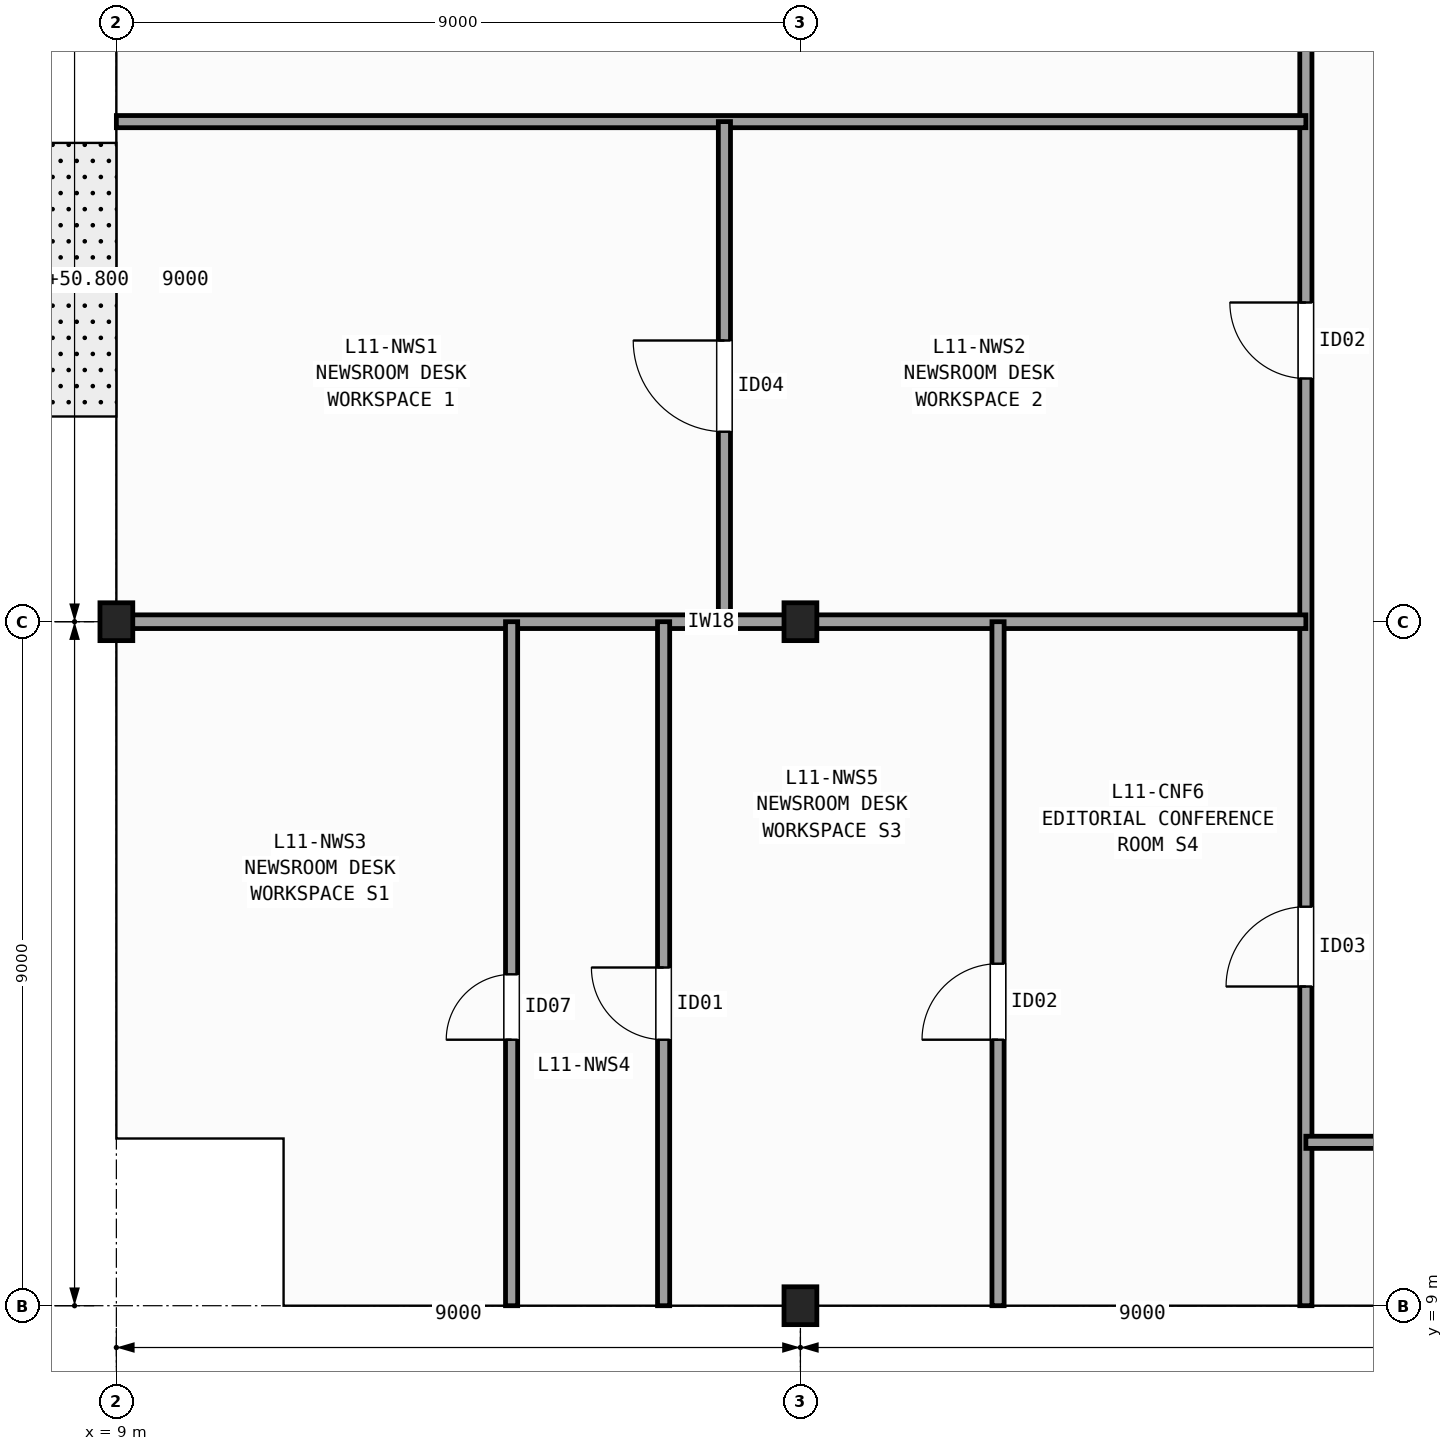
"""IFC4 building model, lengths in metres.
Left out: names, types, materials, properties, quantities, classifications, styles, units other than length and angle.
Written with IfcOpenShell. Run it as: python <this file> out.ifc"""

import sys

from ifc_helpers import new_model, si_unit, direction, frame, frame_2d, origin, origin_2d, place, context, subcontext, project, spatial, rectangle, i_section, extrude, element, fill, save


model = new_model("IFC4")
c1 = context("Model", 3, precision=1e-05, world=origin(), true_north=direction((0.0, 1.0)))
c2 = subcontext(c1, "Body", "Model", "MODEL_VIEW")
j1 = project(units=[si_unit("LENGTHUNIT", "METRE"), si_unit("PLANEANGLEUNIT", "RADIAN")], contexts=[c1])
p1 = place(None, origin())
s1 = spatial("IfcSite", under=j1, at=p1, CompositionType="ELEMENT")
p2 = place(p1, origin())
s2 = spatial("IfcBuilding", under=s1, at=p2, CompositionType="ELEMENT")
p3 = place(p2, frame((0.0, 0.0, 50.8)))
s3 = spatial("IfcBuildingStorey", under=s2, at=p3, CompositionType="ELEMENT", Elevation=50.8)
for number, where, z_axis, x_axis in (
    (1, (9.0, 18.0, 0.0), (0.0, 0.0, 1.0), (1.0, 0.0, 0.0)),
    (2, (18.0, 9.0, 0.0), (0.0, 0.0, 1.0), (1.0, 0.0, 0.0)),
    (3, (18.0, 18.0, 0.0), (0.0, 0.0, 1.0), (1.0, 0.0, 0.0)),
):
    element("IfcColumn", number, at=place(p3, frame(where, z_axis=z_axis, x_axis=x_axis)), inside=s3, PredefinedType="COLUMN", context=c2, shape_type="SweptSolid", body=[
        extrude(i_section(OverallWidth=0.432, OverallDepth=0.498, WebThickness=0.056, FlangeThickness=0.089, FilletRadius=0.015, at=origin_2d()), origin(), (0.0, 0.0, 1.0), 3.7),
    ])
p4 = place(p3, frame((24.65, 9.0, 0.0), z_axis=(0.0, 0.0, 1.0), x_axis=(0.0, 1.0, 0.0)))
e4 = element("IfcWall", 4, at=p4, inside=s3, PredefinedType="PARTITIONING", context=c2, shape_type="SweptSolid", body=[
    extrude(rectangle(XDim=19.2, YDim=0.16, at=frame_2d((9.6, 0.0))), origin(), (0.0, 0.0, 1.0), 2.627),
])
p5 = place(p4, frame((12.2, 0.0, 0.0)))
e5 = element("IfcOpeningElement", 5, at=p5, cuts=e4, PredefinedType="OPENING", context=c2, shape_type="SweptSolid", body=[
    extrude(rectangle(XDim=1.0, YDim=2.1, at=frame_2d((0.5, 1.05))), frame((0.0, 0.09, 0.0), z_axis=(0.0, -1.0, 0.0), x_axis=(1.0, 0.0, 0.0)), (0.0, 0.0, 1.0), 0.18),
])
p6 = place(p4, frame((4.2, 0.0, 0.0)))
e6 = element("IfcOpeningElement", 6, at=p6, cuts=e4, PredefinedType="OPENING", context=c2, shape_type="SweptSolid", body=[
    extrude(rectangle(XDim=1.05, YDim=2.15, at=frame_2d((0.525, 1.075))), frame((0.0, 0.09, 0.0), z_axis=(0.0, -1.0, 0.0), x_axis=(1.0, 0.0, 0.0)), (0.0, 0.0, 1.0), 0.18),
])
p7 = place(p3, frame((9.0, 24.58, 0.0), z_axis=(0.0, 0.0, 1.0), x_axis=(1.0, 0.0, 0.0)))
e7 = element("IfcWall", 7, at=p7, inside=s3, PredefinedType="PARTITIONING", context=c2, shape_type="SweptSolid", body=[
    extrude(rectangle(XDim=15.65, YDim=0.16, at=frame_2d((7.825, 0.0))), origin(), (0.0, 0.0, 1.0), 2.627),
])
p8 = place(p3, frame((9.0, 18.0, 0.0), z_axis=(0.0, 0.0, 1.0), x_axis=(1.0, 0.0, 0.0)))
e8 = element("IfcWall", 8, at=p8, inside=s3, PredefinedType="PARTITIONING", context=c2, shape_type="SweptSolid", body=[
    extrude(rectangle(XDim=15.65, YDim=0.18, at=frame_2d((7.825, 0.0))), origin(), (0.0, 0.0, 1.0), 2.627),
])
p9 = place(p3, frame((17.0, 18.0, 0.0), z_axis=(0.0, 0.0, 1.0), x_axis=(0.0, 1.0, 0.0)))
e9 = element("IfcWall", 9, at=p9, inside=s3, PredefinedType="PARTITIONING", context=c2, shape_type="SweptSolid", body=[
    extrude(rectangle(XDim=6.58, YDim=0.16, at=frame_2d((3.29, 0.0))), origin(), (0.0, 0.0, 1.0), 2.789),
])
p10 = place(p9, frame((2.5, 0.0, 0.0)))
e10 = element("IfcOpeningElement", 10, at=p10, cuts=e9, PredefinedType="OPENING", context=c2, shape_type="SweptSolid", body=[
    extrude(rectangle(XDim=1.2, YDim=2.15, at=frame_2d((0.6, 1.075))), frame((0.0, 0.09, 0.0), z_axis=(0.0, -1.0, 0.0), x_axis=(1.0, 0.0, 0.0)), (0.0, 0.0, 1.0), 0.18),
])
p11 = place(p3, frame((14.2, 9.0, 0.0), z_axis=(0.0, 0.0, 1.0), x_axis=(0.0, 1.0, 0.0)))
e11 = element("IfcWall", 11, at=p11, inside=s3, PredefinedType="PARTITIONING", context=c2, shape_type="SweptSolid", body=[
    extrude(rectangle(XDim=9.0, YDim=0.16, at=frame_2d((4.5, 0.0))), origin(), (0.0, 0.0, 1.0), 2.789),
])
p12 = place(p11, frame((3.5, 0.0, 0.0)))
e12 = element("IfcOpeningElement", 12, at=p12, cuts=e11, PredefinedType="OPENING", context=c2, shape_type="SweptSolid", body=[
    extrude(rectangle(XDim=0.86, YDim=2.05, at=frame_2d((0.43, 1.025))), frame((0.0, 0.09, 0.0), z_axis=(0.0, -1.0, 0.0), x_axis=(1.0, 0.0, 0.0)), (0.0, 0.0, 1.0), 0.18),
])
p13 = place(p3, frame((16.2, 9.0, 0.0), z_axis=(0.0, 0.0, 1.0), x_axis=(0.0, 1.0, 0.0)))
e13 = element("IfcWall", 13, at=p13, inside=s3, PredefinedType="PARTITIONING", context=c2, shape_type="SweptSolid", body=[
    extrude(rectangle(XDim=9.0, YDim=0.16, at=frame_2d((4.5, 0.0))), origin(), (0.0, 0.0, 1.0), 2.789),
])
p14 = place(p13, frame((3.5, 0.0, 0.0)))
e14 = element("IfcOpeningElement", 14, at=p14, cuts=e13, PredefinedType="OPENING", context=c2, shape_type="SweptSolid", body=[
    extrude(rectangle(XDim=0.95, YDim=2.1, at=frame_2d((0.475, 1.05))), frame((0.0, 0.09, 0.0), z_axis=(0.0, -1.0, 0.0), x_axis=(1.0, 0.0, 0.0)), (0.0, 0.0, 1.0), 0.18),
])
p15 = place(p3, frame((20.6, 9.0, 0.0), z_axis=(0.0, 0.0, 1.0), x_axis=(0.0, 1.0, 0.0)))
e15 = element("IfcWall", 15, at=p15, inside=s3, PredefinedType="PARTITIONING", context=c2, shape_type="SweptSolid", body=[
    extrude(rectangle(XDim=9.0, YDim=0.16, at=frame_2d((4.5, 0.0))), origin(), (0.0, 0.0, 1.0), 2.627),
])
p16 = place(p15, frame((3.5, 0.0, 0.0)))
e16 = element("IfcOpeningElement", 16, at=p16, cuts=e15, PredefinedType="OPENING", context=c2, shape_type="SweptSolid", body=[
    extrude(rectangle(XDim=1.0, YDim=2.1, at=frame_2d((0.5, 1.05))), frame((0.0, 0.09, 0.0), z_axis=(0.0, -1.0, 0.0), x_axis=(1.0, 0.0, 0.0)), (0.0, 0.0, 1.0), 0.18),
])
p17 = place(p3, frame((24.65, 11.15, 0.0), z_axis=(0.0, 0.0, 1.0), x_axis=(1.0, 0.0, 0.0)))
e17 = element("IfcWall", 17, at=p17, inside=s3, PredefinedType="PARTITIONING", context=c2, shape_type="SweptSolid", body=[
    extrude(rectangle(XDim=4.75, YDim=0.16, at=frame_2d((2.375, 0.0))), origin(), (0.0, 0.0, 1.0), 2.792),
])
p18 = place(p17, frame((1.2, 0.0, 0.0)))
e18 = element("IfcOpeningElement", 18, at=p18, cuts=e17, PredefinedType="OPENING", context=c2, shape_type="SweptSolid", body=[
    extrude(rectangle(XDim=0.95, YDim=2.1, at=frame_2d((0.475, 1.05))), frame((0.0, 0.09, 0.0), z_axis=(0.0, -1.0, 0.0), x_axis=(1.0, 0.0, 0.0)), (0.0, 0.0, 1.0), 0.18),
])
p19 = place(p5, origin())
e19 = element("IfcDoor", 19, at=p19, inside=s3, OperationType="SINGLE_SWING_RIGHT", PredefinedType="DOOR", context=c2, shape_type="SweptSolid", body=[
    extrude(rectangle(XDim=1.0, YDim=2.1, at=frame_2d((0.5, 1.05))), frame((0.0, 0.025, 0.0), z_axis=(0.0, -1.0, 0.0), x_axis=(1.0, 0.0, 0.0)), (0.0, 0.0, 1.0), 0.05),
])
fill(e5, e19)
p20 = place(p6, origin())
e20 = element("IfcDoor", 20, at=p20, inside=s3, OperationType="SINGLE_SWING_LEFT", PredefinedType="DOOR", context=c2, shape_type="SweptSolid", body=[
    extrude(rectangle(XDim=1.05, YDim=2.15, at=frame_2d((0.525, 1.075))), frame((0.0, 0.025, 0.0), z_axis=(0.0, -1.0, 0.0), x_axis=(1.0, 0.0, 0.0)), (0.0, 0.0, 1.0), 0.05),
])
fill(e6, e20)
p21 = place(p10, origin())
e21 = element("IfcDoor", 21, at=p21, inside=s3, OperationType="SINGLE_SWING_RIGHT", PredefinedType="DOOR", context=c2, shape_type="SweptSolid", body=[
    extrude(rectangle(XDim=1.2, YDim=2.15, at=frame_2d((0.6, 1.075))), frame((0.0, 0.025, 0.0), z_axis=(0.0, -1.0, 0.0), x_axis=(1.0, 0.0, 0.0)), (0.0, 0.0, 1.0), 0.05),
])
fill(e10, e21)
p22 = place(p12, origin())
e22 = element("IfcDoor", 22, at=p22, inside=s3, OperationType="SINGLE_SWING_LEFT", PredefinedType="DOOR", context=c2, shape_type="SweptSolid", body=[
    extrude(rectangle(XDim=0.86, YDim=2.05, at=frame_2d((0.43, 1.025))), frame((0.0, 0.025, 0.0), z_axis=(0.0, -1.0, 0.0), x_axis=(1.0, 0.0, 0.0)), (0.0, 0.0, 1.0), 0.05),
])
fill(e12, e22)
p23 = place(p14, origin())
e23 = element("IfcDoor", 23, at=p23, inside=s3, OperationType="SINGLE_SWING_RIGHT", PredefinedType="DOOR", context=c2, shape_type="SweptSolid", body=[
    extrude(rectangle(XDim=0.95, YDim=2.1, at=frame_2d((0.475, 1.05))), frame((0.0, 0.025, 0.0), z_axis=(0.0, -1.0, 0.0), x_axis=(1.0, 0.0, 0.0)), (0.0, 0.0, 1.0), 0.05),
])
fill(e14, e23)
p24 = place(p16, origin())
e24 = element("IfcDoor", 24, at=p24, inside=s3, OperationType="SINGLE_SWING_LEFT", PredefinedType="DOOR", context=c2, shape_type="SweptSolid", body=[
    extrude(rectangle(XDim=1.0, YDim=2.1, at=frame_2d((0.5, 1.05))), frame((0.0, 0.025, 0.0), z_axis=(0.0, -1.0, 0.0), x_axis=(1.0, 0.0, 0.0)), (0.0, 0.0, 1.0), 0.05),
])
fill(e16, e24)
save(model, sys.argv[1])
